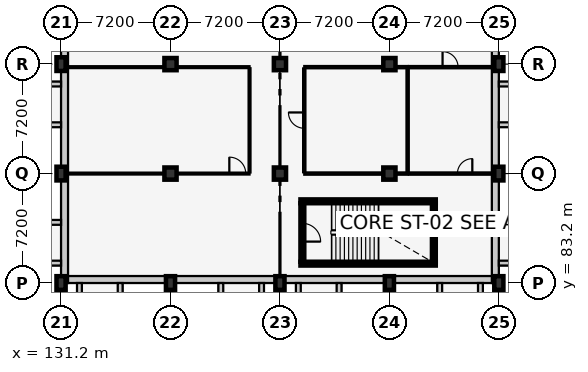
"""IFC4 building model, lengths in metres.
Left out: names, types, materials, properties, quantities, classifications, styles, units other than length and angle.
Written with IfcOpenShell. Run it as: python <this file> out.ifc"""

import sys

from ifc_helpers import new_model, si_unit, direction, frame, frame_2d, origin, origin_2d, place, context, subcontext, project, spatial, rectangle, extrude, element, fill, save


model = new_model("IFC4")
c1 = context("Model", 3, precision=1e-05, world=origin(), true_north=direction((0.0, 1.0)))
c2 = subcontext(c1, "Body", "Model", "MODEL_VIEW")
j1 = project(units=[si_unit("LENGTHUNIT", "METRE"), si_unit("PLANEANGLEUNIT", "RADIAN")], contexts=[c1])
p1 = place(None, origin())
s1 = spatial("IfcSite", under=j1, at=p1, CompositionType="ELEMENT")
p2 = place(p1, origin())
s2 = spatial("IfcBuilding", under=s1, at=p2, CompositionType="ELEMENT")
p3 = place(p2, frame((0.0, 0.0, 5.4)))
s3 = spatial("IfcBuildingStorey", under=s2, at=p3, CompositionType="ELEMENT", Elevation=5.4)
for number, where, z_axis, x_axis in (
    (1, (131.2, 83.2, 0.0), (0.0, 0.0, 1.0), (1.0, 0.0, 0.0)),
    (2, (131.2, 90.4, 0.0), (0.0, 0.0, 1.0), (1.0, 0.0, 0.0)),
    (3, (131.2, 97.6, 0.0), (0.0, 0.0, 1.0), (1.0, 0.0, 0.0)),
    (4, (138.4, 83.2, 0.0), (0.0, 0.0, 1.0), (1.0, 0.0, 0.0)),
):
    element("IfcColumn", number, at=place(p3, frame(where, z_axis=z_axis, x_axis=x_axis)), inside=s3, PredefinedType="COLUMN", context=c2, shape_type="SweptSolid", body=[
        extrude(rectangle(XDim=0.6, YDim=0.9, at=origin_2d()), origin(), (0.0, 0.0, 1.0), 4.2),
    ])
for number, where, z_axis, x_axis in (
    (5, (138.4, 90.4, 0.0), (0.0, 0.0, 1.0), (1.0, 0.0, 0.0)),
    (6, (138.4, 97.6, 0.0), (0.0, 0.0, 1.0), (1.0, 0.0, 0.0)),
):
    element("IfcColumn", number, at=place(p3, frame(where, z_axis=z_axis, x_axis=x_axis)), inside=s3, PredefinedType="COLUMN", context=c2, shape_type="SweptSolid", body=[
        extrude(rectangle(XDim=0.8, YDim=0.8, at=origin_2d()), origin(), (0.0, 0.0, 1.0), 4.2),
    ])
p4 = place(p3, frame((145.6, 83.2, 0.0), z_axis=(0.0, 0.0, 1.0), x_axis=(1.0, 0.0, 0.0)))
e7 = element("IfcColumn", 7, at=p4, inside=s3, PredefinedType="COLUMN", context=c2, shape_type="SweptSolid", body=[
    extrude(rectangle(XDim=0.6, YDim=0.9, at=origin_2d()), origin(), (0.0, 0.0, 1.0), 4.2),
])
for number, where, z_axis, x_axis in (
    (8, (145.6, 90.4, 0.0), (0.0, 0.0, 1.0), (1.0, 0.0, 0.0)),
    (9, (145.6, 97.6, 0.0), (0.0, 0.0, 1.0), (1.0, 0.0, 0.0)),
):
    element("IfcColumn", number, at=place(p3, frame(where, z_axis=z_axis, x_axis=x_axis)), inside=s3, PredefinedType="COLUMN", context=c2, shape_type="SweptSolid", body=[
        extrude(rectangle(XDim=0.8, YDim=0.8, at=origin_2d()), origin(), (0.0, 0.0, 1.0), 4.2),
    ])
p5 = place(p3, frame((152.8, 83.2, 0.0), z_axis=(0.0, 0.0, 1.0), x_axis=(1.0, 0.0, 0.0)))
e10 = element("IfcColumn", 10, at=p5, inside=s3, PredefinedType="COLUMN", context=c2, shape_type="SweptSolid", body=[
    extrude(rectangle(XDim=0.6, YDim=0.9, at=origin_2d()), origin(), (0.0, 0.0, 1.0), 4.2),
])
for number, where, z_axis, x_axis in (
    (11, (152.8, 90.4, 0.0), (0.0, 0.0, 1.0), (1.0, 0.0, 0.0)),
    (12, (152.8, 97.6, 0.0), (0.0, 0.0, 1.0), (1.0, 0.0, 0.0)),
):
    element("IfcColumn", number, at=place(p3, frame(where, z_axis=z_axis, x_axis=x_axis)), inside=s3, PredefinedType="COLUMN", context=c2, shape_type="SweptSolid", body=[
        extrude(rectangle(XDim=0.8, YDim=0.8, at=origin_2d()), origin(), (0.0, 0.0, 1.0), 4.2),
    ])
for number, where, z_axis, x_axis in (
    (13, (160.0, 83.2, 0.0), (0.0, 0.0, 1.0), (1.0, 0.0, 0.0)),
    (14, (160.0, 90.4, 0.0), (0.0, 0.0, 1.0), (1.0, 0.0, 0.0)),
    (15, (160.0, 97.6, 0.0), (0.0, 0.0, 1.0), (1.0, 0.0, 0.0)),
):
    element("IfcColumn", number, at=place(p3, frame(where, z_axis=z_axis, x_axis=x_axis)), inside=s3, PredefinedType="COLUMN", context=c2, shape_type="SweptSolid", body=[
        extrude(rectangle(XDim=0.6, YDim=0.9, at=origin_2d()), origin(), (0.0, 0.0, 1.0), 4.2),
    ])
p6 = place(p3, frame((160.0, 83.43, 0.0), z_axis=(0.0, 0.0, 1.0), x_axis=(-1.0, 0.0, 0.0)))
e16 = element("IfcWall", 16, at=p6, inside=s3, PredefinedType="SOLIDWALL", context=c2, shape_type="SweptSolid", body=[
    extrude(rectangle(XDim=28.8, YDim=0.46, at=frame_2d((14.4, 0.0))), origin(), (0.0, 0.0, 1.0), 3.245),
])
p7 = place(p3, frame((132.41, 83.2, 0.0), z_axis=(0.0, 0.0, 1.0), x_axis=(0.0, -1.0, 0.0)))
e17 = element("IfcWall", 17, at=p7, inside=s3, PredefinedType="SOLIDWALL", context=c2, shape_type="SweptSolid", body=[
    extrude(rectangle(XDim=1.793, YDim=0.32, at=frame_2d((0.896, 0.0))), origin(), (0.0, 0.0, 1.0), 3.93),
])
for number, where, z_axis, x_axis in (
    (18, (135.09, 83.2, 0.0), (0.0, 0.0, 1.0), (0.0, -1.0, 0.0)),
    (19, (141.71, 83.2, 0.0), (0.0, 0.0, 1.0), (0.0, -1.0, 0.0)),
):
    element("IfcWall", number, at=place(p3, frame(where, z_axis=z_axis, x_axis=x_axis)), inside=s3, PredefinedType="SOLIDWALL", context=c2, shape_type="SweptSolid", body=[
        extrude(rectangle(XDim=1.35, YDim=0.32, at=frame_2d((0.675, 0.0))), origin(), (0.0, 0.0, 1.0), 3.93),
    ])
for number, where, z_axis, x_axis in (
    (20, (144.39, 83.2, 0.0), (0.0, 0.0, 1.0), (0.0, -1.0, 0.0)),
    (21, (146.81, 83.2, 0.0), (0.0, 0.0, 1.0), (0.0, -1.0, 0.0)),
):
    element("IfcWall", number, at=place(p3, frame(where, z_axis=z_axis, x_axis=x_axis)), inside=s3, PredefinedType="SOLIDWALL", context=c2, shape_type="SweptSolid", body=[
        extrude(rectangle(XDim=1.793, YDim=0.32, at=frame_2d((0.896, 0.0))), origin(), (0.0, 0.0, 1.0), 3.93),
    ])
for number, where, z_axis, x_axis in (
    (22, (149.49, 83.2, 0.0), (0.0, 0.0, 1.0), (0.0, -1.0, 0.0)),
    (23, (156.11, 83.2, 0.0), (0.0, 0.0, 1.0), (0.0, -1.0, 0.0)),
):
    element("IfcWall", number, at=place(p3, frame(where, z_axis=z_axis, x_axis=x_axis)), inside=s3, PredefinedType="SOLIDWALL", context=c2, shape_type="SweptSolid", body=[
        extrude(rectangle(XDim=1.35, YDim=0.32, at=frame_2d((0.675, 0.0))), origin(), (0.0, 0.0, 1.0), 3.93),
    ])
p8 = place(p3, frame((158.79, 83.2, 0.0), z_axis=(0.0, 0.0, 1.0), x_axis=(0.0, -1.0, 0.0)))
e24 = element("IfcWall", 24, at=p8, inside=s3, PredefinedType="SOLIDWALL", context=c2, shape_type="SweptSolid", body=[
    extrude(rectangle(XDim=1.793, YDim=0.32, at=frame_2d((0.896, 0.0))), origin(), (0.0, 0.0, 1.0), 3.93),
])
p9 = place(p3, frame((159.77, 112.0, 0.0), z_axis=(0.0, 0.0, 1.0), x_axis=(0.0, -1.0, 0.0)))
e25 = element("IfcWall", 25, at=p9, inside=s3, PredefinedType="SOLIDWALL", context=c2, shape_type="SweptSolid", body=[
    extrude(rectangle(XDim=28.8, YDim=0.46, at=frame_2d((14.4, 0.0))), origin(), (0.0, 0.0, 1.0), 3.205),
])
p10 = place(p3, frame((160.0, 84.51, 0.0), z_axis=(0.0, 0.0, 1.0), x_axis=(1.0, 0.0, 0.0)))
e26 = element("IfcWall", 26, at=p10, inside=s3, PredefinedType="SOLIDWALL", context=c2, shape_type="SweptSolid", body=[
    extrude(rectangle(XDim=1.35, YDim=0.32, at=frame_2d((0.675, 0.0))), origin(), (0.0, 0.0, 1.0), 3.93),
])
for number, where, z_axis, x_axis in (
    (27, (160.0, 87.19, 0.0), (0.0, 0.0, 1.0), (1.0, 0.0, 0.0)),
    (28, (160.0, 93.61, 0.0), (0.0, 0.0, 1.0), (1.0, 0.0, 0.0)),
):
    element("IfcWall", number, at=place(p3, frame(where, z_axis=z_axis, x_axis=x_axis)), inside=s3, PredefinedType="SOLIDWALL", context=c2, shape_type="SweptSolid", body=[
        extrude(rectangle(XDim=1.793, YDim=0.32, at=frame_2d((0.896, 0.0))), origin(), (0.0, 0.0, 1.0), 3.93),
    ])
p11 = place(p3, frame((160.0, 96.29, 0.0), z_axis=(0.0, 0.0, 1.0), x_axis=(1.0, 0.0, 0.0)))
e29 = element("IfcWall", 29, at=p11, inside=s3, PredefinedType="SOLIDWALL", context=c2, shape_type="SweptSolid", body=[
    extrude(rectangle(XDim=1.35, YDim=0.32, at=frame_2d((0.675, 0.0))), origin(), (0.0, 0.0, 1.0), 3.93),
])
p12 = place(p3, frame((131.43, 83.2, 0.0), z_axis=(0.0, 0.0, 1.0), x_axis=(0.0, 1.0, 0.0)))
e30 = element("IfcWall", 30, at=p12, inside=s3, PredefinedType="SOLIDWALL", context=c2, shape_type="SweptSolid", body=[
    extrude(rectangle(XDim=28.8, YDim=0.46, at=frame_2d((14.4, 0.0))), origin(), (0.0, 0.0, 1.0), 3.205),
])
p13 = place(p3, frame((131.2, 84.51, 0.0), z_axis=(0.0, 0.0, 1.0), x_axis=(-1.0, 0.0, 0.0)))
e31 = element("IfcWall", 31, at=p13, inside=s3, PredefinedType="SOLIDWALL", context=c2, shape_type="SweptSolid", body=[
    extrude(rectangle(XDim=1.793, YDim=0.32, at=frame_2d((0.896, 0.0))), origin(), (0.0, 0.0, 1.0), 3.93),
])
for number, where, z_axis, x_axis in (
    (32, (131.2, 87.19, 0.0), (0.0, 0.0, 1.0), (-1.0, 0.0, 0.0)),
    (33, (131.2, 93.61, 0.0), (0.0, 0.0, 1.0), (-1.0, 0.0, 0.0)),
):
    element("IfcWall", number, at=place(p3, frame(where, z_axis=z_axis, x_axis=x_axis)), inside=s3, PredefinedType="SOLIDWALL", context=c2, shape_type="SweptSolid", body=[
        extrude(rectangle(XDim=1.35, YDim=0.32, at=frame_2d((0.675, 0.0))), origin(), (0.0, 0.0, 1.0), 3.93),
    ])
p14 = place(p3, frame((131.2, 96.29, 0.0), z_axis=(0.0, 0.0, 1.0), x_axis=(-1.0, 0.0, 0.0)))
e34 = element("IfcWall", 34, at=p14, inside=s3, PredefinedType="SOLIDWALL", context=c2, shape_type="SweptSolid", body=[
    extrude(rectangle(XDim=1.793, YDim=0.32, at=frame_2d((0.896, 0.0))), origin(), (0.0, 0.0, 1.0), 3.93),
])
for number, where, z_axis, x_axis in (
    (35, (146.95, 84.475, 0.0), (0.0, 0.0, 1.0), (1.0, 0.0, 0.0)),
    (36, (155.85, 88.575, 0.0), (0.0, 0.0, 1.0), (-1.0, 0.0, 0.0)),
):
    element("IfcWall", number, at=place(p3, frame(where, z_axis=z_axis, x_axis=x_axis)), inside=s3, PredefinedType="SHEAR", context=c2, shape_type="SweptSolid", body=[
        extrude(rectangle(XDim=8.9, YDim=0.25, at=frame_2d((4.45, 0.0))), origin(), (0.0, 0.0, 1.0), 3.95),
    ])
p15 = place(p3, frame((147.075, 88.45, 0.0), z_axis=(0.0, 0.0, 1.0), x_axis=(0.0, -1.0, 0.0)))
e37 = element("IfcWall", 37, at=p15, inside=s3, PredefinedType="SHEAR", context=c2, shape_type="SweptSolid", body=[
    extrude(rectangle(XDim=3.85, YDim=0.25, at=frame_2d((1.925, 0.0))), origin(), (0.0, 0.0, 1.0), 3.95),
])
p16 = place(p15, frame((1.325, 0.0, 0.0)))
e38 = element("IfcOpeningElement", 38, at=p16, cuts=e37, PredefinedType="OPENING", context=c2, shape_type="SweptSolid", body=[
    extrude(rectangle(XDim=1.2, YDim=2.15, at=frame_2d((0.6, 1.075))), frame((0.0, 0.137, 0.0), z_axis=(0.0, -1.0, 0.0), x_axis=(1.0, 0.0, 0.0)), (0.0, 0.0, 1.0), 0.274),
])
p17 = place(p3, frame((155.725, 84.6, 0.0), z_axis=(0.0, 0.0, 1.0), x_axis=(0.0, 1.0, 0.0)))
e39 = element("IfcWall", 39, at=p17, inside=s3, PredefinedType="SHEAR", context=c2, shape_type="SweptSolid", body=[
    extrude(rectangle(XDim=3.85, YDim=0.25, at=frame_2d((1.925, 0.0))), origin(), (0.0, 0.0, 1.0), 3.95),
])
p18 = place(p3, frame((131.67, 90.4, 0.0), z_axis=(0.0, 0.0, 1.0), x_axis=(1.0, 0.0, 0.0)))
e40 = element("IfcWall", 40, at=p18, inside=s3, PredefinedType="PARTITIONING", context=c2, shape_type="SweptSolid", body=[
    extrude(rectangle(XDim=11.93, YDim=0.125, at=frame_2d((5.965, 0.0))), origin(), (0.0, 0.0, 1.0), 3.275),
])
p19 = place(p18, frame((10.6, 0.0, 0.0)))
e41 = element("IfcOpeningElement", 41, at=p19, cuts=e40, PredefinedType="OPENING", context=c2, shape_type="SweptSolid", body=[
    extrude(rectangle(XDim=1.08, YDim=2.15, at=frame_2d((0.54, 1.075))), frame((0.0, 0.074, 0.0), z_axis=(0.0, -1.0, 0.0), x_axis=(1.0, 0.0, 0.0)), (0.0, 0.0, 1.0), 0.149),
])
p20 = place(p3, frame((131.67, 97.4, 0.0), z_axis=(0.0, 0.0, 1.0), x_axis=(1.0, 0.0, 0.0)))
e42 = element("IfcWall", 42, at=p20, inside=s3, PredefinedType="PARTITIONING", context=c2, shape_type="SweptSolid", body=[
    extrude(rectangle(XDim=11.93, YDim=0.125, at=frame_2d((5.965, 0.0))), origin(), (0.0, 0.0, 1.0), 3.275),
])
p21 = place(p3, frame((143.6, 90.472, 0.0), z_axis=(0.0, 0.0, 1.0), x_axis=(0.0, 1.0, 0.0)))
e43 = element("IfcWall", 43, at=p21, inside=s3, PredefinedType="PARTITIONING", context=c2, shape_type="SweptSolid", body=[
    extrude(rectangle(XDim=6.855, YDim=0.125, at=frame_2d((3.427, 0.0))), origin(), (0.0, 0.0, 1.0), 3.95),
])
for number, where, z_axis, x_axis in (
    (44, (147.2, 90.4, 0.0), (0.0, 0.0, 1.0), (1.0, 0.0, 0.0)),
    (45, (147.2, 97.4, 0.0), (0.0, 0.0, 1.0), (1.0, 0.0, 0.0)),
):
    element("IfcWall", number, at=place(p3, frame(where, z_axis=z_axis, x_axis=x_axis)), inside=s3, PredefinedType="PARTITIONING", context=c2, shape_type="SweptSolid", body=[
        extrude(rectangle(XDim=6.8, YDim=0.15, at=frame_2d((3.4, 0.0))), origin(), (0.0, 0.0, 1.0), 3.125),
    ])
p22 = place(p3, frame((147.2, 90.485, 0.0), z_axis=(0.0, 0.0, 1.0), x_axis=(0.0, 1.0, 0.0)))
e46 = element("IfcWall", 46, at=p22, inside=s3, PredefinedType="PARTITIONING", context=c2, shape_type="SweptSolid", body=[
    extrude(rectangle(XDim=6.83, YDim=0.15, at=frame_2d((3.415, 0.0))), origin(), (0.0, 0.0, 1.0), 3.95),
])
p23 = place(p22, frame((2.895, 0.0, 0.0)))
e47 = element("IfcOpeningElement", 47, at=p23, cuts=e46, PredefinedType="OPENING", context=c2, shape_type="SweptSolid", body=[
    extrude(rectangle(XDim=1.04, YDim=2.15, at=frame_2d((0.52, 1.075))), frame((0.0, 0.087, 0.0), z_axis=(0.0, -1.0, 0.0), x_axis=(1.0, 0.0, 0.0)), (0.0, 0.0, 1.0), 0.174),
])
p24 = place(p3, frame((154.0, 90.485, 0.0), z_axis=(0.0, 0.0, 1.0), x_axis=(0.0, 1.0, 0.0)))
e48 = element("IfcWall", 48, at=p24, inside=s3, PredefinedType="PARTITIONING", context=c2, shape_type="SweptSolid", body=[
    extrude(rectangle(XDim=6.83, YDim=0.15, at=frame_2d((3.415, 0.0))), origin(), (0.0, 0.0, 1.0), 3.95),
])
p25 = place(p3, frame((154.085, 90.4, 0.0), z_axis=(0.0, 0.0, 1.0), x_axis=(1.0, 0.0, 0.0)))
e49 = element("IfcWall", 49, at=p25, inside=s3, PredefinedType="PARTITIONING", context=c2, shape_type="SweptSolid", body=[
    extrude(rectangle(XDim=5.445, YDim=0.15, at=frame_2d((2.723, 0.0))), origin(), (0.0, 0.0, 1.0), 3.125),
])
p26 = place(p25, frame((3.19, 0.0, 0.0)))
e50 = element("IfcOpeningElement", 50, at=p26, cuts=e49, PredefinedType="OPENING", context=c2, shape_type="SweptSolid", body=[
    extrude(rectangle(XDim=0.98, YDim=2.12, at=frame_2d((0.49, 1.06))), frame((0.0, 0.087, 0.0), z_axis=(0.0, -1.0, 0.0), x_axis=(1.0, 0.0, 0.0)), (0.0, 0.0, 1.0), 0.174),
])
p27 = place(p3, frame((154.085, 97.4, 0.0), z_axis=(0.0, 0.0, 1.0), x_axis=(1.0, 0.0, 0.0)))
e51 = element("IfcWall", 51, at=p27, inside=s3, PredefinedType="PARTITIONING", context=c2, shape_type="SweptSolid", body=[
    extrude(rectangle(XDim=5.445, YDim=0.15, at=frame_2d((2.723, 0.0))), origin(), (0.0, 0.0, 1.0), 3.125),
])
p28 = place(p27, frame((2.212, 0.0, 0.0)))
e52 = element("IfcOpeningElement", 52, at=p28, cuts=e51, PredefinedType="OPENING", context=c2, shape_type="SweptSolid", body=[
    extrude(rectangle(XDim=1.02, YDim=2.12, at=frame_2d((0.51, 1.06))), frame((0.0, 0.087, 0.0), z_axis=(0.0, -1.0, 0.0), x_axis=(1.0, 0.0, 0.0)), (0.0, 0.0, 1.0), 0.174),
])
p29 = place(p16, origin())
e53 = element("IfcDoor", 53, at=p29, inside=s3, OperationType="SINGLE_SWING_RIGHT", PredefinedType="DOOR", context=c2, shape_type="SweptSolid", body=[
    extrude(rectangle(XDim=1.2, YDim=2.15, at=frame_2d((0.6, 1.075))), frame((0.0, 0.025, 0.0), z_axis=(0.0, -1.0, 0.0), x_axis=(1.0, 0.0, 0.0)), (0.0, 0.0, 1.0), 0.05),
])
fill(e38, e53)
p30 = place(p19, origin())
e54 = element("IfcDoor", 54, at=p30, inside=s3, OperationType="SINGLE_SWING_LEFT", PredefinedType="DOOR", context=c2, shape_type="SweptSolid", body=[
    extrude(rectangle(XDim=1.08, YDim=2.15, at=frame_2d((0.54, 1.075))), frame((0.0, 0.025, 0.0), z_axis=(0.0, -1.0, 0.0), x_axis=(1.0, 0.0, 0.0)), (0.0, 0.0, 1.0), 0.05),
])
fill(e41, e54)
p31 = place(p23, origin())
e55 = element("IfcDoor", 55, at=p31, inside=s3, OperationType="SINGLE_SWING_RIGHT", PredefinedType="DOOR", context=c2, shape_type="SweptSolid", body=[
    extrude(rectangle(XDim=1.04, YDim=2.15, at=frame_2d((0.52, 1.075))), frame((0.0, 0.025, 0.0), z_axis=(0.0, -1.0, 0.0), x_axis=(1.0, 0.0, 0.0)), (0.0, 0.0, 1.0), 0.05),
])
fill(e47, e55)
p32 = place(p28, origin())
e56 = element("IfcDoor", 56, at=p32, inside=s3, OperationType="SINGLE_SWING_LEFT", PredefinedType="DOOR", context=c2, shape_type="SweptSolid", body=[
    extrude(rectangle(XDim=1.02, YDim=2.12, at=frame_2d((0.51, 1.06))), frame((0.0, 0.025, 0.0), z_axis=(0.0, -1.0, 0.0), x_axis=(1.0, 0.0, 0.0)), (0.0, 0.0, 1.0), 0.05),
])
fill(e52, e56)
p33 = place(p26, origin())
e57 = element("IfcDoor", 57, at=p33, inside=s3, OperationType="SINGLE_SWING_RIGHT", PredefinedType="DOOR", context=c2, shape_type="SweptSolid", body=[
    extrude(rectangle(XDim=0.98, YDim=2.12, at=frame_2d((0.49, 1.06))), frame((0.0, 0.025, 0.0), z_axis=(0.0, -1.0, 0.0), x_axis=(1.0, 0.0, 0.0)), (0.0, 0.0, 1.0), 0.05),
])
fill(e50, e57)
save(model, sys.argv[1])
